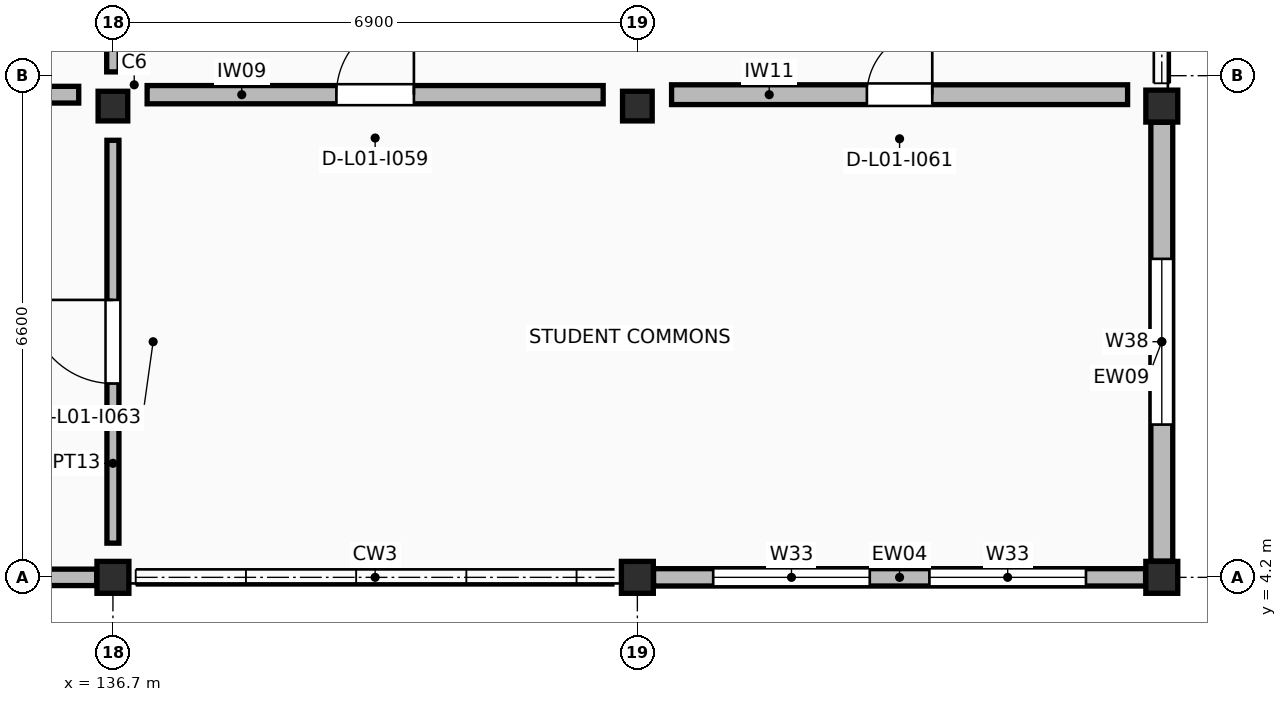
"""IFC4 building model, lengths in metres.
Left out: names, types, materials, properties, quantities, classifications, styles, units other than length and angle.
Written with IfcOpenShell. Run it as: python <this file> out.ifc"""

import sys

from ifc_helpers import new_model, si_unit, direction, frame, frame_2d, origin, origin_2d, place, context, subcontext, project, spatial, rectangle, extrude, element, fill, save


model = new_model("IFC4")
c1 = context("Model", 3, precision=1e-05, world=origin(), true_north=direction((0.0, 1.0)))
c2 = subcontext(c1, "Body", "Model", "MODEL_VIEW")
j1 = project(units=[si_unit("LENGTHUNIT", "METRE"), si_unit("PLANEANGLEUNIT", "RADIAN")], contexts=[c1])
p1 = place(None, origin())
s1 = spatial("IfcSite", under=j1, at=p1, CompositionType="ELEMENT")
p2 = place(p1, origin())
s2 = spatial("IfcBuilding", under=s1, at=p2, CompositionType="ELEMENT")
p3 = place(p2, frame((0.0, 0.0, 4.42)))
s3 = spatial("IfcBuildingStorey", under=s2, at=p3, CompositionType="ELEMENT", Elevation=4.42)
p4 = place(p3, frame((136.7, 4.2, 0.0), z_axis=(0.0, 0.0, 1.0), x_axis=(1.0, 0.0, 0.0)))
e1 = element("IfcColumn", 1, at=p4, inside=s3, PredefinedType="COLUMN", context=c2, shape_type="SweptSolid", body=[
    extrude(rectangle(XDim=0.42, YDim=0.42, at=origin_2d()), origin(), (0.0, 0.0, 1.0), 3.74),
])
p5 = place(p3, frame((136.7, 10.4, 0.0), z_axis=(0.0, 0.0, 1.0), x_axis=(1.0, 0.0, 0.0)))
e2 = element("IfcColumn", 2, at=p5, inside=s3, PredefinedType="COLUMN", context=c2, shape_type="SweptSolid", body=[
    extrude(rectangle(XDim=0.39, YDim=0.39, at=origin_2d()), origin(), (0.0, 0.0, 1.0), 3.74),
])
p6 = place(p3, frame((143.6, 4.2, 0.0), z_axis=(0.0, 0.0, 1.0), x_axis=(1.0, 0.0, 0.0)))
e3 = element("IfcColumn", 3, at=p6, inside=s3, PredefinedType="COLUMN", context=c2, shape_type="SweptSolid", body=[
    extrude(rectangle(XDim=0.42, YDim=0.42, at=origin_2d()), origin(), (0.0, 0.0, 1.0), 3.74),
])
p7 = place(p3, frame((143.6, 10.4, 0.0), z_axis=(0.0, 0.0, 1.0), x_axis=(1.0, 0.0, 0.0)))
e4 = element("IfcColumn", 4, at=p7, inside=s3, PredefinedType="COLUMN", context=c2, shape_type="SweptSolid", body=[
    extrude(rectangle(XDim=0.39, YDim=0.39, at=origin_2d()), origin(), (0.0, 0.0, 1.0), 3.74),
])
for number, where, z_axis, x_axis in (
    (5, (150.5, 4.2, 0.0), (0.0, 0.0, 1.0), (1.0, 0.0, 0.0)),
    (6, (150.5, 10.4, 0.0), (0.0, 0.0, 1.0), (1.0, 0.0, 0.0)),
):
    element("IfcColumn", number, at=place(p3, frame(where, z_axis=z_axis, x_axis=x_axis)), inside=s3, PredefinedType="COLUMN", context=c2, shape_type="SweptSolid", body=[
        extrude(rectangle(XDim=0.42, YDim=0.42, at=origin_2d()), origin(), (0.0, 0.0, 1.0), 3.74),
    ])
p8 = place(p3, frame((130.013, 4.2, 0.0), z_axis=(0.0, 0.0, 1.0), x_axis=(1.0, 0.0, 0.0)))
e7 = element("IfcWall", 7, at=p8, inside=s3, PredefinedType="STANDARD", context=c2, shape_type="SweptSolid", body=[
    extrude(rectangle(XDim=6.474, YDim=0.216, at=frame_2d((3.237, 0.0))), origin(), (0.0, 0.0, 1.0), 2.78),
])
p9 = place(p8, frame((0.865, 0.0, 0.95)))
e8 = element("IfcOpeningElement", 8, at=p9, cuts=e7, PredefinedType="OPENING", context=c2, shape_type="SweptSolid", body=[
    extrude(rectangle(XDim=1.94, YDim=1.6, at=frame_2d((0.97, 0.8))), frame((0.0, 0.118, 0.0), z_axis=(0.0, -1.0, 0.0), x_axis=(1.0, 0.0, 0.0)), (0.0, 0.0, 1.0), 0.236),
])
p10 = place(p8, frame((3.669, 0.0, 0.95)))
e9 = element("IfcOpeningElement", 9, at=p10, cuts=e7, PredefinedType="OPENING", context=c2, shape_type="SweptSolid", body=[
    extrude(rectangle(XDim=1.94, YDim=1.6, at=frame_2d((0.97, 0.8))), frame((0.0, 0.118, 0.0), z_axis=(0.0, -1.0, 0.0), x_axis=(1.0, 0.0, 0.0)), (0.0, 0.0, 1.0), 0.236),
])
p11 = place(p3, frame((143.813, 4.2, 0.0), z_axis=(0.0, 0.0, 1.0), x_axis=(1.0, 0.0, 0.0)))
e10 = element("IfcWall", 10, at=p11, inside=s3, PredefinedType="STANDARD", context=c2, shape_type="SweptSolid", body=[
    extrude(rectangle(XDim=6.474, YDim=0.228, at=frame_2d((3.237, 0.0))), origin(), (0.0, 0.0, 1.0), 2.78),
])
p12 = place(p11, frame((0.785, 0.0, 0.95)))
e11 = element("IfcOpeningElement", 11, at=p12, cuts=e10, PredefinedType="OPENING", context=c2, shape_type="SweptSolid", body=[
    extrude(rectangle(XDim=2.06, YDim=1.15, at=frame_2d((1.03, 0.575))), frame((0.0, 0.124, 0.0), z_axis=(0.0, -1.0, 0.0), x_axis=(1.0, 0.0, 0.0)), (0.0, 0.0, 1.0), 0.248),
])
p13 = place(p11, frame((3.629, 0.0, 0.95)))
e12 = element("IfcOpeningElement", 12, at=p13, cuts=e10, PredefinedType="OPENING", context=c2, shape_type="SweptSolid", body=[
    extrude(rectangle(XDim=2.06, YDim=1.15, at=frame_2d((1.03, 0.575))), frame((0.0, 0.124, 0.0), z_axis=(0.0, -1.0, 0.0), x_axis=(1.0, 0.0, 0.0)), (0.0, 0.0, 1.0), 0.248),
])
p14 = place(p3, frame((150.5, 4.413, 0.0), z_axis=(0.0, 0.0, 1.0), x_axis=(0.0, 1.0, 0.0)))
e13 = element("IfcWall", 13, at=p14, inside=s3, PredefinedType="STANDARD", context=c2, shape_type="SweptSolid", body=[
    extrude(rectangle(XDim=5.774, YDim=0.288, at=frame_2d((2.887, 0.0))), origin(), (0.0, 0.0, 1.0), 2.78),
])
p15 = place(p14, frame((1.797, 0.0, 0.95)))
e14 = element("IfcOpeningElement", 14, at=p15, cuts=e13, PredefinedType="OPENING", context=c2, shape_type="SweptSolid", body=[
    extrude(rectangle(XDim=2.18, YDim=1.3, at=frame_2d((1.09, 0.65))), frame((0.0, 0.154, 0.0), z_axis=(0.0, -1.0, 0.0), x_axis=(1.0, 0.0, 0.0)), (0.0, 0.0, 1.0), 0.308),
])
p16 = place(p3, frame((130.25, 10.55, 0.0), z_axis=(0.0, 0.0, 1.0), x_axis=(1.0, 0.0, 0.0)))
e15 = element("IfcWall", 15, at=p16, inside=s3, PredefinedType="STANDARD", context=c2, shape_type="SweptSolid", body=[
    extrude(rectangle(XDim=6.0, YDim=0.22, at=frame_2d((3.0, 0.0))), origin(), (0.0, 0.0, 1.0), 2.75),
])
p17 = place(p3, frame((137.15, 10.55, 0.0), z_axis=(0.0, 0.0, 1.0), x_axis=(1.0, 0.0, 0.0)))
e16 = element("IfcWall", 16, at=p17, inside=s3, PredefinedType="STANDARD", context=c2, shape_type="SweptSolid", body=[
    extrude(rectangle(XDim=6.0, YDim=0.24, at=frame_2d((3.0, 0.0))), origin(), (0.0, 0.0, 1.0), 2.75),
])
p18 = place(p17, frame((2.49, 0.0, 0.0)))
e17 = element("IfcOpeningElement", 17, at=p18, cuts=e16, PredefinedType="OPENING", context=c2, shape_type="SweptSolid", body=[
    extrude(rectangle(XDim=1.02, YDim=2.24, at=frame_2d((0.51, 1.12))), frame((0.0, 0.13, 0.0), z_axis=(0.0, -1.0, 0.0), x_axis=(1.0, 0.0, 0.0)), (0.0, 0.0, 1.0), 0.26),
])
p19 = place(p3, frame((144.05, 10.55, 0.0), z_axis=(0.0, 0.0, 1.0), x_axis=(1.0, 0.0, 0.0)))
e18 = element("IfcWall", 18, at=p19, inside=s3, PredefinedType="STANDARD", context=c2, shape_type="SweptSolid", body=[
    extrude(rectangle(XDim=6.0, YDim=0.26, at=frame_2d((3.0, 0.0))), origin(), (0.0, 0.0, 1.0), 2.75),
])
p20 = place(p19, frame((2.57, 0.0, 0.0)))
e19 = element("IfcOpeningElement", 19, at=p20, cuts=e18, PredefinedType="OPENING", context=c2, shape_type="SweptSolid", body=[
    extrude(rectangle(XDim=0.86, YDim=2.12, at=frame_2d((0.43, 1.06))), frame((0.0, 0.14, 0.0), z_axis=(0.0, -1.0, 0.0), x_axis=(1.0, 0.0, 0.0)), (0.0, 0.0, 1.0), 0.28),
])
p21 = place(p3, frame((136.7, 4.65, 0.0), z_axis=(0.0, 0.0, 1.0), x_axis=(0.0, 1.0, 0.0)))
e20 = element("IfcWall", 20, at=p21, inside=s3, PredefinedType="PARTITIONING", context=c2, shape_type="SweptSolid", body=[
    extrude(rectangle(XDim=5.3, YDim=0.158, at=frame_2d((2.65, 0.0))), origin(), (0.0, 0.0, 1.0), 2.75),
])
p22 = place(p21, frame((2.1, 0.0, 0.0)))
e21 = element("IfcOpeningElement", 21, at=p22, cuts=e20, PredefinedType="OPENING", context=c2, shape_type="SweptSolid", body=[
    extrude(rectangle(XDim=1.1, YDim=2.24, at=frame_2d((0.55, 1.12))), frame((0.0, 0.089, 0.0), z_axis=(0.0, -1.0, 0.0), x_axis=(1.0, 0.0, 0.0)), (0.0, 0.0, 1.0), 0.178),
])
p23 = place(p3, frame((136.7, 10.85, 0.0), z_axis=(0.0, 0.0, 1.0), x_axis=(0.0, 1.0, 0.0)))
e22 = element("IfcWall", 22, at=p23, inside=s3, PredefinedType="PARTITIONING", context=c2, shape_type="SweptSolid", body=[
    extrude(rectangle(XDim=5.3, YDim=0.164, at=frame_2d((2.65, 0.0))), origin(), (0.0, 0.0, 1.0), 2.75),
])
p24 = place(p12, origin())
e23 = element("IfcWindow", 23, at=p24, inside=s3, PartitioningType="SINGLE_PANEL", PredefinedType="WINDOW", context=c2, shape_type="SweptSolid", body=[
    extrude(rectangle(XDim=2.06, YDim=1.15, at=frame_2d((1.03, 0.575))), frame((0.0, 0.03, 0.0), z_axis=(0.0, -1.0, 0.0), x_axis=(1.0, 0.0, 0.0)), (0.0, 0.0, 1.0), 0.06),
])
fill(e11, e23)
p25 = place(p13, origin())
e24 = element("IfcWindow", 24, at=p25, inside=s3, PartitioningType="SINGLE_PANEL", PredefinedType="WINDOW", context=c2, shape_type="SweptSolid", body=[
    extrude(rectangle(XDim=2.06, YDim=1.15, at=frame_2d((1.03, 0.575))), frame((0.0, 0.03, 0.0), z_axis=(0.0, -1.0, 0.0), x_axis=(1.0, 0.0, 0.0)), (0.0, 0.0, 1.0), 0.06),
])
fill(e12, e24)
p26 = place(p15, origin())
e25 = element("IfcWindow", 25, at=p26, inside=s3, PartitioningType="SINGLE_PANEL", PredefinedType="WINDOW", context=c2, shape_type="SweptSolid", body=[
    extrude(rectangle(XDim=2.18, YDim=1.3, at=frame_2d((1.09, 0.65))), frame((0.0, 0.03, 0.0), z_axis=(0.0, -1.0, 0.0), x_axis=(1.0, 0.0, 0.0)), (0.0, 0.0, 1.0), 0.06),
])
fill(e14, e25)
p27 = place(p18, origin())
e26 = element("IfcDoor", 26, at=p27, inside=s3, OperationType="SINGLE_SWING_RIGHT", PredefinedType="DOOR", context=c2, shape_type="SweptSolid", body=[
    extrude(rectangle(XDim=1.02, YDim=2.24, at=frame_2d((0.51, 1.12))), frame((0.0, 0.025, 0.0), z_axis=(0.0, -1.0, 0.0), x_axis=(1.0, 0.0, 0.0)), (0.0, 0.0, 1.0), 0.05),
])
fill(e17, e26)
p28 = place(p20, origin())
e27 = element("IfcDoor", 27, at=p28, inside=s3, OperationType="SINGLE_SWING_RIGHT", PredefinedType="DOOR", context=c2, shape_type="SweptSolid", body=[
    extrude(rectangle(XDim=0.86, YDim=2.12, at=frame_2d((0.43, 1.06))), frame((0.0, 0.025, 0.0), z_axis=(0.0, -1.0, 0.0), x_axis=(1.0, 0.0, 0.0)), (0.0, 0.0, 1.0), 0.05),
])
fill(e19, e27)
p29 = place(p22, frame((1.1, 0.0, 0.0), z_axis=(0.0, 0.0, 1.0), x_axis=(-1.0, 0.0, 0.0)))
e28 = element("IfcDoor", 28, at=p29, inside=s3, OperationType="SINGLE_SWING_RIGHT", PredefinedType="DOOR", context=c2, shape_type="SweptSolid", body=[
    extrude(rectangle(XDim=1.1, YDim=2.24, at=frame_2d((0.55, 1.12))), frame((0.0, 0.025, 0.0), z_axis=(0.0, -1.0, 0.0), x_axis=(1.0, 0.0, 0.0)), (0.0, 0.0, 1.0), 0.05),
])
fill(e21, e28)
save(model, sys.argv[1])
